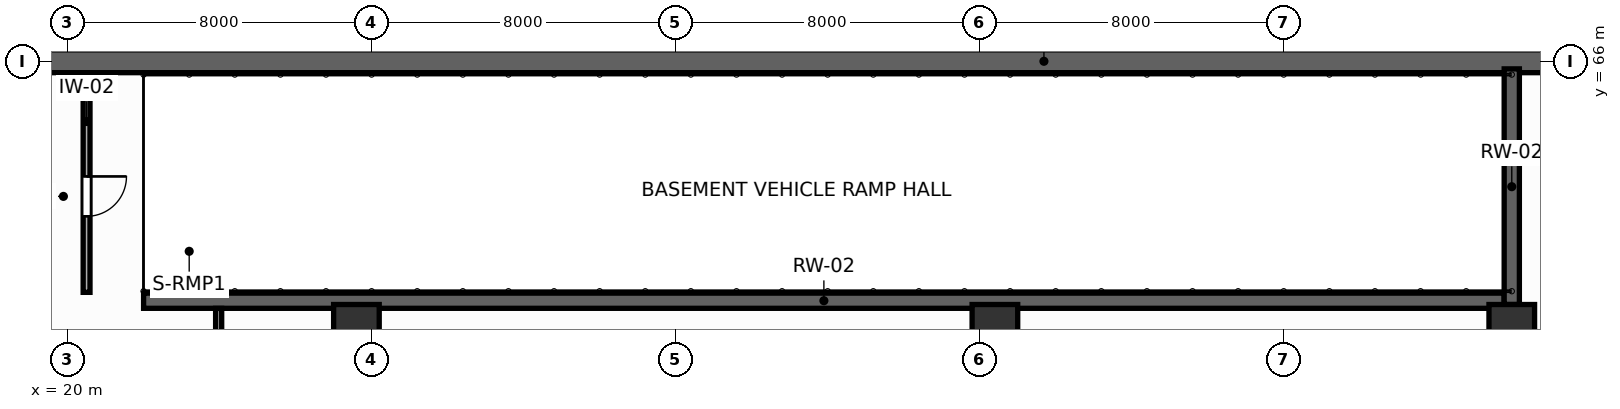
"""IFC4 building model, lengths in metres.
Left out: names, types, materials, properties, quantities, classifications, styles, units other than length and angle.
Written with IfcOpenShell. Run it as: python <this file> out.ifc"""

import sys

from ifc_helpers import new_model, si_unit, direction, frame, frame_2d, origin, origin_2d, place, context, subcontext, project, spatial, rectangle, extrude, source, transform, mapped, element, fill, save


model = new_model("IFC4")
c1 = context("Model", 3, precision=1e-05, world=origin(), true_north=direction((0.0, 1.0)))
c2 = subcontext(c1, "Body", "Model", "MODEL_VIEW")
j1 = project(units=[si_unit("LENGTHUNIT", "METRE"), si_unit("PLANEANGLEUNIT", "RADIAN")], contexts=[c1])
p1 = place(None, origin())
s1 = spatial("IfcSite", under=j1, at=p1, CompositionType="ELEMENT")
p2 = place(p1, origin())
s2 = spatial("IfcBuilding", under=s1, at=p2, CompositionType="ELEMENT")
p3 = place(p2, frame((0.0, 0.0, -4.5)))
s3 = spatial("IfcBuildingStorey", under=s2, at=p3, CompositionType="ELEMENT", Elevation=-4.5)
p4 = place(p3, frame((1.7, 66.0, 0.0), z_axis=(0.0, 0.0, 1.0), x_axis=(1.0, 0.0, 0.0)))
e1 = element("IfcWall", 1, at=p4, inside=s3, PredefinedType="SOLIDWALL", context=c2, shape_type="SweptSolid", body=[
    extrude(rectangle(XDim=87.98, YDim=0.6, at=frame_2d((43.99, 0.0))), origin(), (0.0, 0.0, 1.0), 4.5),
])
p5 = place(p3, frame((22.0, 59.7, 0.0), z_axis=(0.0, 0.0, 1.0), x_axis=(1.0, 0.0, 0.0)))
e2 = element("IfcWall", 2, at=p5, inside=s3, PredefinedType="SOLIDWALL", context=c2, shape_type="SweptSolid", body=[
    extrude(rectangle(XDim=35.8, YDim=0.4, at=frame_2d((17.9, 0.0))), origin(), (0.0, 0.0, 1.0), 4.22),
])
p6 = place(p3, frame((58.0, 59.6, 0.0), z_axis=(0.0, 0.0, 1.0), x_axis=(0.0, 1.0, 0.0)))
e3 = element("IfcWall", 3, at=p6, inside=s3, PredefinedType="SOLIDWALL", context=c2, shape_type="SweptSolid", body=[
    extrude(rectangle(XDim=6.2, YDim=0.4, at=frame_2d((3.1, 0.0))), origin(), (0.0, 0.0, 1.0), 4.22),
])
m1 = source(origin(), c2, "Body", "SweptSolid", [
    extrude(rectangle(XDim=1.2, YDim=1.2, at=origin_2d()), origin(), (0.0, 0.0, 1.0), 4.5),
])
for number, where, z_axis, x_axis in (
    (4, (27.6, 59.0, 0.0), (0.0, 0.0, 1.0), (1.0, 0.0, 0.0)),
    (5, (44.4, 59.0, 0.0), (0.0, 0.0, 1.0), (1.0, 0.0, 0.0)),
    (6, (58.0, 59.0, 0.0), (0.0, 0.0, 1.0), (1.0, 0.0, 0.0)),
):
    element("IfcColumn", number, at=place(p3, frame(where, z_axis=z_axis, x_axis=x_axis)), inside=s3, PredefinedType="COLUMN", context=c2, shape_type="MappedRepresentation", body=[
        mapped(m1, transform((0.0, 0.0, 0.0), scale=1.0)),
    ])
p7 = place(p3, frame((20.5, 59.92, 0.0), z_axis=(0.0, 0.0, 1.0), x_axis=(0.0, 1.0, 0.0)))
e7 = element("IfcWall", 7, at=p7, inside=s3, PredefinedType="PARTITIONING", context=c2, shape_type="SweptSolid", body=[
    extrude(rectangle(XDim=5.76, YDim=0.18, at=frame_2d((2.88, 0.0))), origin(), (0.0, 0.0, 1.0), 4.22),
])
p8 = place(p7, frame((2.0, 0.0, 0.0)))
e8 = element("IfcOpeningElement", 8, at=p8, cuts=e7, PredefinedType="OPENING", context=c2, shape_type="SweptSolid", body=[
    extrude(rectangle(XDim=1.05, YDim=2.1, at=frame_2d((0.525, 1.05))), frame((0.0, 0.1, 0.0), z_axis=(0.0, -1.0, 0.0), x_axis=(1.0, 0.0, 0.0)), (0.0, 0.0, 1.0), 0.2),
])
p9 = place(p3, frame((23.975, 32.32, 0.0), z_axis=(0.0, 0.0, 1.0), x_axis=(0.0, 1.0, 0.0)))
e9 = element("IfcWall", 9, at=p9, inside=s3, PredefinedType="PARTITIONING", context=c2, shape_type="SweptSolid", body=[
    extrude(rectangle(XDim=27.178, YDim=0.16, at=frame_2d((13.589, 0.0))), origin(), (0.0, 0.0, 1.0), 4.22),
])
p10 = place(p9, frame((12.463, 0.0, 0.0)))
e10 = element("IfcOpeningElement", 10, at=p10, cuts=e9, PredefinedType="OPENING", context=c2, shape_type="SweptSolid", body=[
    extrude(rectangle(XDim=0.95, YDim=2.05, at=frame_2d((0.475, 1.025))), frame((0.0, 0.09, 0.0), z_axis=(0.0, -1.0, 0.0), x_axis=(1.0, 0.0, 0.0)), (0.0, 0.0, 1.0), 0.18),
])
p11 = place(p8, frame((1.05, 0.0, 0.0), z_axis=(0.0, 0.0, 1.0), x_axis=(-1.0, 0.0, 0.0)))
e11 = element("IfcDoor", 11, at=p11, inside=s3, OperationType="SINGLE_SWING_LEFT", PredefinedType="DOOR", context=c2, shape_type="SweptSolid", body=[
    extrude(rectangle(XDim=1.05, YDim=2.1, at=frame_2d((0.525, 1.05))), frame((0.0, 0.025, 0.0), z_axis=(0.0, -1.0, 0.0), x_axis=(1.0, 0.0, 0.0)), (0.0, 0.0, 1.0), 0.05),
])
fill(e8, e11)
save(model, sys.argv[1])
